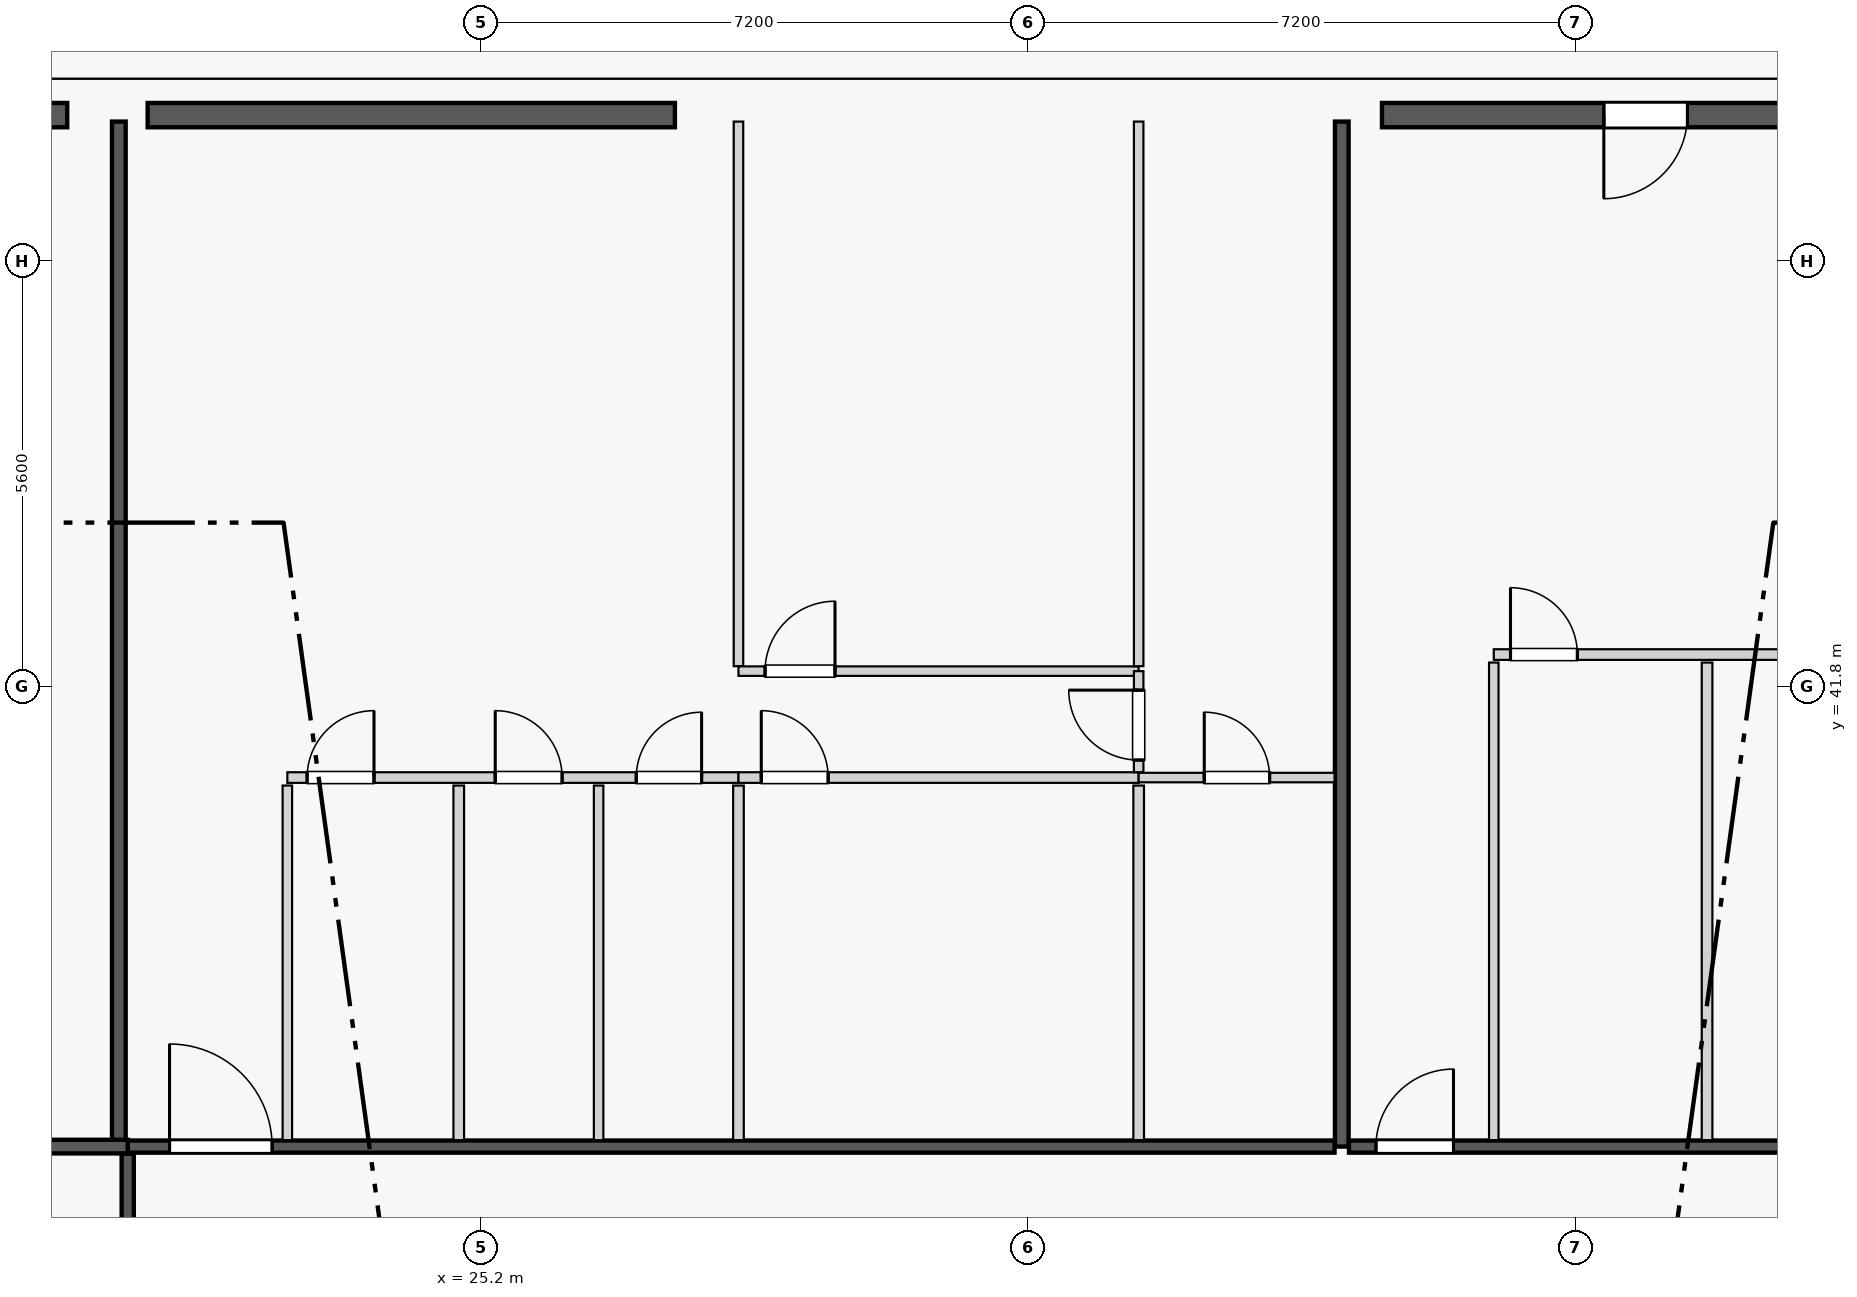
"""IFC4 building model, lengths in metres.
Left out: names, types, materials, properties, quantities, classifications, styles, units other than length and angle.
Written with IfcOpenShell. Run it as: python <this file> out.ifc"""

import sys

from ifc_helpers import new_model, si_unit, direction, frame, frame_2d, origin, origin_2d, place, context, subcontext, project, spatial, rectangle, extrude, element, fill, save


model = new_model("IFC4")
c1 = context("Model", 3, precision=1e-05, world=origin(), true_north=direction((0.0, 1.0)))
c2 = subcontext(c1, "Body", "Model", "MODEL_VIEW")
j1 = project(units=[si_unit("LENGTHUNIT", "METRE"), si_unit("PLANEANGLEUNIT", "RADIAN")], contexts=[c1])
p1 = place(None, origin())
s1 = spatial("IfcSite", under=j1, at=p1, CompositionType="ELEMENT")
p2 = place(p1, origin())
s2 = spatial("IfcBuilding", under=s1, at=p2, CompositionType="ELEMENT")
p3 = place(p2, frame((0.0, 0.0, 94.2)))
s3 = spatial("IfcBuildingStorey", under=s2, at=p3, CompositionType="ELEMENT", Elevation=94.2)
for number, where, z_axis, x_axis in (
    (1, (36.522, 49.258, 0.0), (0.0, 0.0, 1.0), (1.0, 0.0, 0.0)),
    (2, (28.278, 49.258, 0.0), (0.0, 0.0, 1.0), (1.0, 0.0, 0.0)),
    (3, (20.283, 49.311, 0.0), (0.0, 0.0, 1.0), (1.0, 0.0, 0.0)),
):
    element("IfcColumn", number, at=place(p3, frame(where, z_axis=z_axis, x_axis=x_axis)), inside=s3, PredefinedType="COLUMN", context=c2, shape_type="SweptSolid", body=[
        extrude(rectangle(XDim=1.05, YDim=1.05, at=origin_2d()), origin(), (0.0, 0.0, 1.0), 4.2),
    ])
p4 = place(p3, frame((43.988, 49.32, 0.0), z_axis=(0.0, 0.0, 1.0), x_axis=(-1.0, 0.0, 0.0)))
e4 = element("IfcWall", 4, at=p4, inside=s3, PredefinedType="STANDARD", context=c2, shape_type="SweptSolid", body=[
    extrude(rectangle(XDim=6.937, YDim=0.32, at=frame_2d((3.469, 0.0))), origin(), (0.0, 0.0, 1.0), 2.59),
])
p5 = place(p4, frame((2.918, 0.0, 0.0)))
e5 = element("IfcOpeningElement", 5, at=p5, cuts=e4, PredefinedType="OPENING", context=c2, shape_type="SweptSolid", body=[
    extrude(rectangle(XDim=1.1, YDim=2.25, at=frame_2d((0.55, 1.125))), frame((0.0, 0.17, 0.0), z_axis=(0.0, -1.0, 0.0), x_axis=(1.0, 0.0, 0.0)), (0.0, 0.0, 1.0), 0.34),
])
p6 = place(p3, frame((27.749, 49.32, 0.0), z_axis=(0.0, 0.0, 1.0), x_axis=(-1.0, 0.0, 0.0)))
e6 = element("IfcWall", 6, at=p6, inside=s3, PredefinedType="STANDARD", context=c2, shape_type="SweptSolid", body=[
    extrude(rectangle(XDim=6.937, YDim=0.32, at=frame_2d((3.469, 0.0))), origin(), (0.0, 0.0, 1.0), 2.59),
])
p7 = place(p6, frame((2.918, 0.0, 0.75)))
e7 = element("IfcOpeningElement", 7, at=p7, cuts=e6, PredefinedType="OPENING", context=c2, shape_type="SweptSolid", body=[
    extrude(rectangle(XDim=1.1, YDim=1.69, at=frame_2d((0.55, 0.845))), frame((0.0, 0.17, 0.0), z_axis=(0.0, -1.0, 0.0), x_axis=(1.0, 0.0, 0.0)), (0.0, 0.0, 1.0), 0.34),
])
p8 = place(p3, frame((19.754, 49.32, 0.0), z_axis=(0.0, 0.0, 1.0), x_axis=(-1.0, 0.0, 0.0)))
e8 = element("IfcWall", 8, at=p8, inside=s3, PredefinedType="STANDARD", context=c2, shape_type="SweptSolid", body=[
    extrude(rectangle(XDim=1.318, YDim=0.32, at=frame_2d((0.659, 0.0))), origin(), (0.0, 0.0, 1.0), 3.99),
])
p9 = place(p8, frame((0.22, 0.0, 0.75)))
e9 = element("IfcOpeningElement", 9, at=p9, cuts=e8, PredefinedType="OPENING", context=c2, shape_type="SweptSolid", body=[
    extrude(rectangle(XDim=0.878, YDim=1.7, at=frame_2d((0.439, 0.85))), frame((0.0, 0.17, 0.0), z_axis=(0.0, -1.0, 0.0), x_axis=(1.0, 0.0, 0.0)), (0.0, 0.0, 1.0), 0.34),
])
for number, where, z_axis, x_axis in (
    (10, (20.433, 35.75, 0.0), (0.0, 0.0, 1.0), (0.0, 1.0, 0.0)),
    (11, (36.522, 35.75, 0.0), (0.0, 0.0, 1.0), (0.0, 1.0, 0.0)),
):
    element("IfcWall", number, at=place(p3, frame(where, z_axis=z_axis, x_axis=x_axis)), inside=s3, PredefinedType="PARTITIONING", context=c2, shape_type="SweptSolid", body=[
        extrude(rectangle(XDim=13.485, YDim=0.18, at=frame_2d((6.743, 0.0))), origin(), (0.0, 0.0, 1.0), 2.59),
    ])
p10 = place(p3, frame((20.528, 35.75, 0.0), z_axis=(0.0, 0.0, 1.0), x_axis=(1.0, 0.0, 0.0)))
e12 = element("IfcWall", 12, at=p10, inside=s3, PredefinedType="PARTITIONING", context=c2, shape_type="SweptSolid", body=[
    extrude(rectangle(XDim=15.899, YDim=0.16, at=frame_2d((7.949, 0.0))), origin(), (0.0, 0.0, 1.0), 3.99),
])
p11 = place(p10, frame((0.572, 0.0, 0.0)))
e13 = element("IfcOpeningElement", 13, at=p11, cuts=e12, PredefinedType="OPENING", context=c2, shape_type="SweptSolid", body=[
    extrude(rectangle(XDim=1.35, YDim=2.35, at=frame_2d((0.675, 1.175))), frame((0.0, 0.09, 0.0), z_axis=(0.0, -1.0, 0.0), x_axis=(1.0, 0.0, 0.0)), (0.0, 0.0, 1.0), 0.18),
])
p12 = place(p3, frame((22.65, 35.835, 0.0), z_axis=(0.0, 0.0, 1.0), x_axis=(0.0, 1.0, 0.0)))
e14 = element("IfcWall", 14, at=p12, inside=s3, PredefinedType="PARTITIONING", context=c2, shape_type="SweptSolid", body=[
    extrude(rectangle(XDim=4.665, YDim=0.125, at=frame_2d((2.333, 0.0))), origin(), (0.0, 0.0, 1.0), 2.59),
])
p13 = place(p3, frame((22.65, 40.605, 0.0), z_axis=(0.0, 0.0, 1.0), x_axis=(1.0, 0.0, 0.0)))
e15 = element("IfcWall", 15, at=p13, inside=s3, PredefinedType="PLUMBINGWALL", context=c2, shape_type="SweptSolid", body=[
    extrude(rectangle(XDim=5.935, YDim=0.14, at=frame_2d((2.968, 0.0))), origin(), (0.0, 0.0, 1.0), 3.99),
])
p14 = place(p13, frame((4.59, 0.0, 0.0)))
e16 = element("IfcOpeningElement", 16, at=p14, cuts=e15, PredefinedType="OPENING", context=c2, shape_type="SweptSolid", body=[
    extrude(rectangle(XDim=0.86, YDim=2.1, at=frame_2d((0.43, 1.05))), frame((0.0, 0.08, 0.0), z_axis=(0.0, -1.0, 0.0), x_axis=(1.0, 0.0, 0.0)), (0.0, 0.0, 1.0), 0.16),
])
p15 = place(p13, frame((0.26, 0.0, 0.0)))
e17 = element("IfcOpeningElement", 17, at=p15, cuts=e15, PredefinedType="OPENING", context=c2, shape_type="SweptSolid", body=[
    extrude(rectangle(XDim=0.88, YDim=2.15, at=frame_2d((0.44, 1.075))), frame((0.0, 0.08, 0.0), z_axis=(0.0, -1.0, 0.0), x_axis=(1.0, 0.0, 0.0)), (0.0, 0.0, 1.0), 0.16),
])
p16 = place(p13, frame((2.735, 0.0, 0.0)))
e18 = element("IfcOpeningElement", 18, at=p16, cuts=e15, PredefinedType="OPENING", context=c2, shape_type="SweptSolid", body=[
    extrude(rectangle(XDim=0.88, YDim=2.15, at=frame_2d((0.44, 1.075))), frame((0.0, 0.08, 0.0), z_axis=(0.0, -1.0, 0.0), x_axis=(1.0, 0.0, 0.0)), (0.0, 0.0, 1.0), 0.16),
])
p17 = place(p3, frame((28.585, 40.605, 0.0), z_axis=(0.0, 0.0, 1.0), x_axis=(1.0, 0.0, 0.0)))
e19 = element("IfcWall", 19, at=p17, inside=s3, PredefinedType="PLUMBINGWALL", context=c2, shape_type="SweptSolid", body=[
    extrude(rectangle(XDim=5.265, YDim=0.14, at=frame_2d((2.633, 0.0))), origin(), (0.0, 0.0, 1.0), 3.99),
])
p18 = place(p17, frame((0.3, 0.0, 0.0)))
e20 = element("IfcOpeningElement", 20, at=p18, cuts=e19, PredefinedType="OPENING", context=c2, shape_type="SweptSolid", body=[
    extrude(rectangle(XDim=0.88, YDim=2.15, at=frame_2d((0.44, 1.075))), frame((0.0, 0.08, 0.0), z_axis=(0.0, -1.0, 0.0), x_axis=(1.0, 0.0, 0.0)), (0.0, 0.0, 1.0), 0.16),
])
p19 = place(p3, frame((33.85, 40.605, 0.0), z_axis=(0.0, 0.0, 1.0), x_axis=(1.0, 0.0, 0.0)))
e21 = element("IfcWall", 21, at=p19, inside=s3, PredefinedType="PARTITIONING", context=c2, shape_type="SweptSolid", body=[
    extrude(rectangle(XDim=2.577, YDim=0.125, at=frame_2d((1.289, 0.0))), origin(), (0.0, 0.0, 1.0), 3.99),
])
p20 = place(p19, frame((0.863, 0.0, 0.0)))
e22 = element("IfcOpeningElement", 22, at=p20, cuts=e21, PredefinedType="OPENING", context=c2, shape_type="SweptSolid", body=[
    extrude(rectangle(XDim=0.86, YDim=2.1, at=frame_2d((0.43, 1.05))), frame((0.0, 0.073, 0.0), z_axis=(0.0, -1.0, 0.0), x_axis=(1.0, 0.0, 0.0)), (0.0, 0.0, 1.0), 0.145),
])
p21 = place(p3, frame((24.905, 35.835, 0.0), z_axis=(0.0, 0.0, 1.0), x_axis=(0.0, 1.0, 0.0)))
e23 = element("IfcWall", 23, at=p21, inside=s3, PredefinedType="PLUMBINGWALL", context=c2, shape_type="SweptSolid", body=[
    extrude(rectangle(XDim=4.665, YDim=0.14, at=frame_2d((2.333, 0.0))), origin(), (0.0, 0.0, 1.0), 3.99),
])
p22 = place(p3, frame((26.745, 35.835, 0.0), z_axis=(0.0, 0.0, 1.0), x_axis=(0.0, 1.0, 0.0)))
e24 = element("IfcWall", 24, at=p22, inside=s3, PredefinedType="PARTITIONING", context=c2, shape_type="SweptSolid", body=[
    extrude(rectangle(XDim=4.665, YDim=0.125, at=frame_2d((2.333, 0.0))), origin(), (0.0, 0.0, 1.0), 3.99),
])
p23 = place(p3, frame((28.585, 42.07, 0.0), z_axis=(0.0, 0.0, 1.0), x_axis=(0.0, 1.0, 0.0)))
e25 = element("IfcWall", 25, at=p23, inside=s3, PredefinedType="PARTITIONING", context=c2, shape_type="SweptSolid", body=[
    extrude(rectangle(XDim=7.165, YDim=0.125, at=frame_2d((3.583, 0.0))), origin(), (0.0, 0.0, 1.0), 2.59),
])
p24 = place(p3, frame((28.585, 42.005, 0.0), z_axis=(0.0, 0.0, 1.0), x_axis=(1.0, 0.0, 0.0)))
e26 = element("IfcWall", 26, at=p24, inside=s3, PredefinedType="PARTITIONING", context=c2, shape_type="SweptSolid", body=[
    extrude(rectangle(XDim=5.265, YDim=0.125, at=frame_2d((2.633, 0.0))), origin(), (0.0, 0.0, 1.0), 3.99),
])
p25 = place(p24, frame((0.35, 0.0, 0.0)))
e27 = element("IfcOpeningElement", 27, at=p25, cuts=e26, PredefinedType="OPENING", context=c2, shape_type="SweptSolid", body=[
    extrude(rectangle(XDim=0.92, YDim=2.15, at=frame_2d((0.46, 1.075))), frame((0.0, 0.073, 0.0), z_axis=(0.0, -1.0, 0.0), x_axis=(1.0, 0.0, 0.0)), (0.0, 0.0, 1.0), 0.145),
])
p26 = place(p3, frame((33.85, 40.675, 0.0), z_axis=(0.0, 0.0, 1.0), x_axis=(0.0, 1.0, 0.0)))
e28 = element("IfcWall", 28, at=p26, inside=s3, PredefinedType="PARTITIONING", context=c2, shape_type="SweptSolid", body=[
    extrude(rectangle(XDim=1.33, YDim=0.125, at=frame_2d((0.665, 0.0))), origin(), (0.0, 0.0, 1.0), 3.99),
])
p27 = place(p26, frame((0.16, 0.0, 0.0)))
e29 = element("IfcOpeningElement", 29, at=p27, cuts=e28, PredefinedType="OPENING", context=c2, shape_type="SweptSolid", body=[
    extrude(rectangle(XDim=0.92, YDim=2.15, at=frame_2d((0.46, 1.075))), frame((0.0, 0.073, 0.0), z_axis=(0.0, -1.0, 0.0), x_axis=(1.0, 0.0, 0.0)), (0.0, 0.0, 1.0), 0.145),
])
p28 = place(p3, frame((28.585, 35.835, 0.0), z_axis=(0.0, 0.0, 1.0), x_axis=(0.0, 1.0, 0.0)))
e30 = element("IfcWall", 30, at=p28, inside=s3, PredefinedType="PLUMBINGWALL", context=c2, shape_type="SweptSolid", body=[
    extrude(rectangle(XDim=4.665, YDim=0.14, at=frame_2d((2.333, 0.0))), origin(), (0.0, 0.0, 1.0), 2.59),
])
p29 = place(p3, frame((33.85, 35.835, 0.0), z_axis=(0.0, 0.0, 1.0), x_axis=(0.0, 1.0, 0.0)))
e31 = element("IfcWall", 31, at=p29, inside=s3, PredefinedType="PLUMBINGWALL", context=c2, shape_type="SweptSolid", body=[
    extrude(rectangle(XDim=4.665, YDim=0.14, at=frame_2d((2.333, 0.0))), origin(), (0.0, 0.0, 1.0), 3.99),
])
p30 = place(p3, frame((33.85, 42.07, 0.0), z_axis=(0.0, 0.0, 1.0), x_axis=(0.0, 1.0, 0.0)))
e32 = element("IfcWall", 32, at=p30, inside=s3, PredefinedType="PARTITIONING", context=c2, shape_type="SweptSolid", body=[
    extrude(rectangle(XDim=7.165, YDim=0.125, at=frame_2d((3.583, 0.0))), origin(), (0.0, 0.0, 1.0), 3.99),
])
p31 = place(p3, frame((36.617, 35.75, 0.0), z_axis=(0.0, 0.0, 1.0), x_axis=(1.0, 0.0, 0.0)))
e33 = element("IfcWall", 33, at=p31, inside=s3, PredefinedType="PARTITIONING", context=c2, shape_type="SweptSolid", body=[
    extrude(rectangle(XDim=7.655, YDim=0.16, at=frame_2d((3.828, 0.0))), origin(), (0.0, 0.0, 1.0), 3.99),
])
p32 = place(p31, frame((0.355, 0.0, 0.0)))
e34 = element("IfcOpeningElement", 34, at=p32, cuts=e33, PredefinedType="OPENING", context=c2, shape_type="SweptSolid", body=[
    extrude(rectangle(XDim=1.02, YDim=2.25, at=frame_2d((0.51, 1.125))), frame((0.0, 0.09, 0.0), z_axis=(0.0, -1.0, 0.0), x_axis=(1.0, 0.0, 0.0)), (0.0, 0.0, 1.0), 0.18),
])
p33 = place(p3, frame((38.522, 35.835, 0.0), z_axis=(0.0, 0.0, 1.0), x_axis=(0.0, 1.0, 0.0)))
e35 = element("IfcWall", 35, at=p33, inside=s3, PredefinedType="PARTITIONING", context=c2, shape_type="SweptSolid", body=[
    extrude(rectangle(XDim=6.283, YDim=0.125, at=frame_2d((3.142, 0.0))), origin(), (0.0, 0.0, 1.0), 3.99),
])
p34 = place(p3, frame((38.522, 42.223, 0.0), z_axis=(0.0, 0.0, 1.0), x_axis=(1.0, 0.0, 0.0)))
e36 = element("IfcWall", 36, at=p34, inside=s3, PredefinedType="PLUMBINGWALL", context=c2, shape_type="SweptSolid", body=[
    extrude(rectangle(XDim=5.75, YDim=0.14, at=frame_2d((2.875, 0.0))), origin(), (0.0, 0.0, 1.0), 3.99),
])
p35 = place(p34, frame((3.853, 0.0, 0.0)))
e37 = element("IfcOpeningElement", 37, at=p35, cuts=e36, PredefinedType="OPENING", context=c2, shape_type="SweptSolid", body=[
    extrude(rectangle(XDim=0.86, YDim=2.1, at=frame_2d((0.43, 1.05))), frame((0.0, 0.08, 0.0), z_axis=(0.0, -1.0, 0.0), x_axis=(1.0, 0.0, 0.0)), (0.0, 0.0, 1.0), 0.16),
])
p36 = place(p34, frame((0.22, 0.0, 0.0)))
e38 = element("IfcOpeningElement", 38, at=p36, cuts=e36, PredefinedType="OPENING", context=c2, shape_type="SweptSolid", body=[
    extrude(rectangle(XDim=0.88, YDim=2.15, at=frame_2d((0.44, 1.075))), frame((0.0, 0.08, 0.0), z_axis=(0.0, -1.0, 0.0), x_axis=(1.0, 0.0, 0.0)), (0.0, 0.0, 1.0), 0.16),
])
p37 = place(p3, frame((41.328, 35.835, 0.0), z_axis=(0.0, 0.0, 1.0), x_axis=(0.0, 1.0, 0.0)))
e39 = element("IfcWall", 39, at=p37, inside=s3, PredefinedType="PLUMBINGWALL", context=c2, shape_type="SweptSolid", body=[
    extrude(rectangle(XDim=6.283, YDim=0.14, at=frame_2d((3.142, 0.0))), origin(), (0.0, 0.0, 1.0), 2.59),
])
p38 = place(p3, frame((10.603, 35.75, 0.0), z_axis=(0.0, 0.0, 1.0), x_axis=(1.0, 0.0, 0.0)))
e40 = element("IfcWall", 40, at=p38, inside=s3, PredefinedType="PARTITIONING", context=c2, shape_type="SweptSolid", body=[
    extrude(rectangle(XDim=9.947, YDim=0.18, at=frame_2d((4.974, 0.0))), origin(), (0.0, 0.0, 1.0), 3.99),
])
p39 = place(p3, frame((20.55, 16.295, 0.0), z_axis=(0.0, 0.0, 1.0), x_axis=(0.0, 1.0, 0.0)))
e41 = element("IfcWall", 41, at=p39, inside=s3, PredefinedType="PARTITIONING", context=c2, shape_type="SweptSolid", body=[
    extrude(rectangle(XDim=19.36, YDim=0.16, at=frame_2d((9.68, 0.0))), origin(), (0.0, 0.0, 1.0), 2.59),
])
p40 = place(p39, frame((0.45, 0.0, 0.0)))
e42 = element("IfcOpeningElement", 42, at=p40, cuts=e41, PredefinedType="OPENING", context=c2, shape_type="SweptSolid", body=[
    extrude(rectangle(XDim=1.02, YDim=2.25, at=frame_2d((0.51, 1.125))), frame((0.0, 0.09, 0.0), z_axis=(0.0, -1.0, 0.0), x_axis=(1.0, 0.0, 0.0)), (0.0, 0.0, 1.0), 0.18),
])
p41 = place(p5, origin())
e43 = element("IfcDoor", 43, at=p41, inside=s3, OperationType="SINGLE_SWING_RIGHT", PredefinedType="DOOR", context=c2, shape_type="SweptSolid", body=[
    extrude(rectangle(XDim=1.1, YDim=2.25, at=frame_2d((0.55, 1.125))), frame((0.0, 0.025, 0.0), z_axis=(0.0, -1.0, 0.0), x_axis=(1.0, 0.0, 0.0)), (0.0, 0.0, 1.0), 0.05),
])
fill(e5, e43)
p42 = place(p7, origin())
e44 = element("IfcWindow", 44, at=p42, inside=s3, PartitioningType="SINGLE_PANEL", PredefinedType="WINDOW", context=c2, shape_type="SweptSolid", body=[
    extrude(rectangle(XDim=1.1, YDim=1.69, at=frame_2d((0.55, 0.845))), frame((0.0, 0.03, 0.0), z_axis=(0.0, -1.0, 0.0), x_axis=(1.0, 0.0, 0.0)), (0.0, 0.0, 1.0), 0.06),
])
fill(e7, e44)
p43 = place(p14, origin())
e45 = element("IfcDoor", 45, at=p43, inside=s3, OperationType="SINGLE_SWING_RIGHT", PredefinedType="DOOR", context=c2, shape_type="SweptSolid", body=[
    extrude(rectangle(XDim=0.86, YDim=2.1, at=frame_2d((0.43, 1.05))), frame((0.0, 0.025, 0.0), z_axis=(0.0, -1.0, 0.0), x_axis=(1.0, 0.0, 0.0)), (0.0, 0.0, 1.0), 0.05),
])
fill(e16, e45)
p44 = place(p20, origin())
e46 = element("IfcDoor", 46, at=p44, inside=s3, OperationType="SINGLE_SWING_LEFT", PredefinedType="DOOR", context=c2, shape_type="SweptSolid", body=[
    extrude(rectangle(XDim=0.86, YDim=2.1, at=frame_2d((0.43, 1.05))), frame((0.0, 0.025, 0.0), z_axis=(0.0, -1.0, 0.0), x_axis=(1.0, 0.0, 0.0)), (0.0, 0.0, 1.0), 0.05),
])
fill(e22, e46)
p45 = place(p11, origin())
e47 = element("IfcDoor", 47, at=p45, inside=s3, OperationType="SINGLE_SWING_LEFT", PredefinedType="DOOR", context=c2, shape_type="SweptSolid", body=[
    extrude(rectangle(XDim=1.35, YDim=2.35, at=frame_2d((0.675, 1.175))), frame((0.0, 0.025, 0.0), z_axis=(0.0, -1.0, 0.0), x_axis=(1.0, 0.0, 0.0)), (0.0, 0.0, 1.0), 0.05),
])
fill(e13, e47)
p46 = place(p15, origin())
e48 = element("IfcDoor", 48, at=p46, inside=s3, OperationType="SINGLE_SWING_RIGHT", PredefinedType="DOOR", context=c2, shape_type="SweptSolid", body=[
    extrude(rectangle(XDim=0.88, YDim=2.15, at=frame_2d((0.44, 1.075))), frame((0.0, 0.025, 0.0), z_axis=(0.0, -1.0, 0.0), x_axis=(1.0, 0.0, 0.0)), (0.0, 0.0, 1.0), 0.05),
])
fill(e17, e48)
p47 = place(p16, origin())
e49 = element("IfcDoor", 49, at=p47, inside=s3, OperationType="SINGLE_SWING_LEFT", PredefinedType="DOOR", context=c2, shape_type="SweptSolid", body=[
    extrude(rectangle(XDim=0.88, YDim=2.15, at=frame_2d((0.44, 1.075))), frame((0.0, 0.025, 0.0), z_axis=(0.0, -1.0, 0.0), x_axis=(1.0, 0.0, 0.0)), (0.0, 0.0, 1.0), 0.05),
])
fill(e18, e49)
p48 = place(p18, origin())
e50 = element("IfcDoor", 50, at=p48, inside=s3, OperationType="SINGLE_SWING_LEFT", PredefinedType="DOOR", context=c2, shape_type="SweptSolid", body=[
    extrude(rectangle(XDim=0.88, YDim=2.15, at=frame_2d((0.44, 1.075))), frame((0.0, 0.025, 0.0), z_axis=(0.0, -1.0, 0.0), x_axis=(1.0, 0.0, 0.0)), (0.0, 0.0, 1.0), 0.05),
])
fill(e20, e50)
p49 = place(p25, origin())
e51 = element("IfcDoor", 51, at=p49, inside=s3, OperationType="SINGLE_SWING_RIGHT", PredefinedType="DOOR", context=c2, shape_type="SweptSolid", body=[
    extrude(rectangle(XDim=0.92, YDim=2.15, at=frame_2d((0.46, 1.075))), frame((0.0, 0.025, 0.0), z_axis=(0.0, -1.0, 0.0), x_axis=(1.0, 0.0, 0.0)), (0.0, 0.0, 1.0), 0.05),
])
fill(e27, e51)
p50 = place(p27, origin())
e52 = element("IfcDoor", 52, at=p50, inside=s3, OperationType="SINGLE_SWING_RIGHT", PredefinedType="DOOR", context=c2, shape_type="SweptSolid", body=[
    extrude(rectangle(XDim=0.92, YDim=2.15, at=frame_2d((0.46, 1.075))), frame((0.0, 0.025, 0.0), z_axis=(0.0, -1.0, 0.0), x_axis=(1.0, 0.0, 0.0)), (0.0, 0.0, 1.0), 0.05),
])
fill(e29, e52)
p51 = place(p32, origin())
e53 = element("IfcDoor", 53, at=p51, inside=s3, OperationType="SINGLE_SWING_RIGHT", PredefinedType="DOOR", context=c2, shape_type="SweptSolid", body=[
    extrude(rectangle(XDim=1.02, YDim=2.25, at=frame_2d((0.51, 1.125))), frame((0.0, 0.025, 0.0), z_axis=(0.0, -1.0, 0.0), x_axis=(1.0, 0.0, 0.0)), (0.0, 0.0, 1.0), 0.05),
])
fill(e34, e53)
p52 = place(p36, origin())
e54 = element("IfcDoor", 54, at=p52, inside=s3, OperationType="SINGLE_SWING_LEFT", PredefinedType="DOOR", context=c2, shape_type="SweptSolid", body=[
    extrude(rectangle(XDim=0.88, YDim=2.15, at=frame_2d((0.44, 1.075))), frame((0.0, 0.025, 0.0), z_axis=(0.0, -1.0, 0.0), x_axis=(1.0, 0.0, 0.0)), (0.0, 0.0, 1.0), 0.05),
])
fill(e38, e54)
save(model, sys.argv[1])
